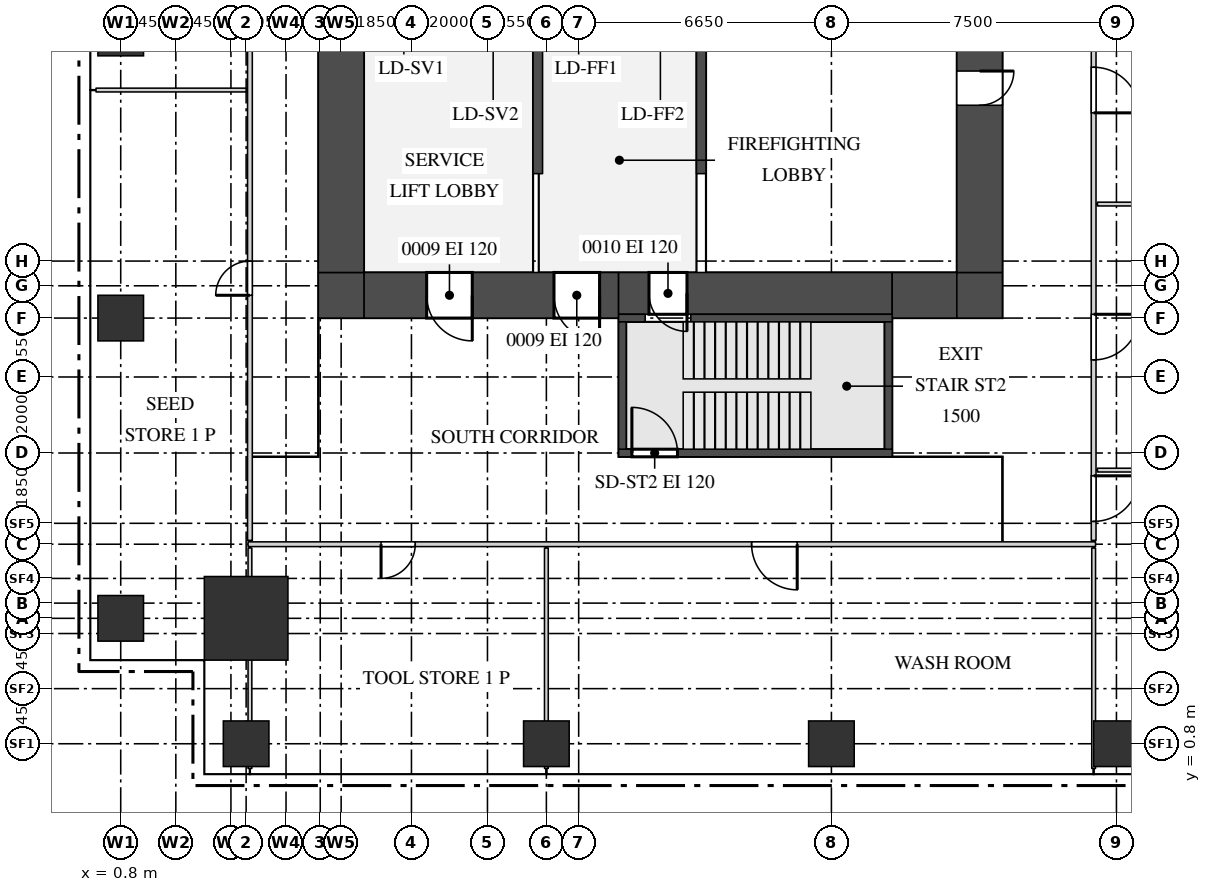
"""IFC4 building model, lengths in metres.
Left out: names, types, materials, properties, quantities, classifications, styles, units other than length and angle.
Written with IfcOpenShell. Run it as: python <this file> out.ifc"""

import sys

from ifc_helpers import new_model, si_unit, direction, frame, frame_2d, origin, origin_2d, place, context, subcontext, project, spatial, rectangle, extrude, source, transform, mapped, element, fill, save


model = new_model("IFC4")
c1 = context("Model", 3, precision=1e-05, world=origin(), true_north=direction((0.0, 1.0)))
c2 = subcontext(c1, "Body", "Model", "MODEL_VIEW")
j1 = project(units=[si_unit("LENGTHUNIT", "METRE"), si_unit("PLANEANGLEUNIT", "RADIAN")], contexts=[c1])
p1 = place(None, origin())
s1 = spatial("IfcSite", under=j1, at=p1, CompositionType="ELEMENT")
p2 = place(p1, origin())
s2 = spatial("IfcBuilding", under=s1, at=p2, CompositionType="ELEMENT")
p3 = place(p2, frame((0.0, 0.0, 60.0)))
s3 = spatial("IfcBuildingStorey", under=s2, at=p3, CompositionType="ELEMENT", Elevation=60.0)
m1 = source(origin(), c2, "Body", "SweptSolid", [
    extrude(rectangle(XDim=6.7, YDim=1.2, at=frame_2d((3.35, 0.0))), origin(), (0.0, 0.0, 1.0), 4.2),
])
p4 = place(p3, frame((7.2, 12.6, 0.0), z_axis=(0.0, 0.0, 1.0), x_axis=(1.0, 0.0, 0.0)))
e1 = element("IfcWall", 1, at=p4, inside=s3, PredefinedType="SHEAR", context=c2, shape_type="MappedRepresentation", body=[
    mapped(m1, transform((0.0, 0.0, 0.0))),
])
m2 = source(origin(), c2, "Body", "SweptSolid", [
    extrude(rectangle(XDim=1.2, YDim=2.1, at=frame_2d((0.6, 1.05))), frame((0.0, 0.61, 0.0), z_axis=(0.0, -1.0, 0.0), x_axis=(1.0, 0.0, 0.0)), (0.0, 0.0, 1.0), 1.22),
])
p5 = place(p4, frame((5.0, 0.0, 0.0)))
e2 = element("IfcOpeningElement", 2, at=p5, cuts=e1, PredefinedType="OPENING", context=c2, shape_type="MappedRepresentation", body=[
    mapped(m2, transform((0.0, 0.0, 0.0))),
])
p6 = place(p4, frame((1.65, 0.0, 0.0)))
e3 = element("IfcOpeningElement", 3, at=p6, cuts=e1, PredefinedType="OPENING", context=c2, shape_type="MappedRepresentation", body=[
    mapped(m2, transform((0.0, 0.0, 0.0))),
])
m3 = source(origin(), c2, "Body", "SweptSolid", [
    extrude(rectangle(XDim=7.2, YDim=1.1, at=frame_2d((3.6, 0.0))), origin(), (0.0, 0.0, 1.0), 4.2),
])
p7 = place(p3, frame((13.9, 12.65, 0.0), z_axis=(0.0, 0.0, 1.0), x_axis=(1.0, 0.0, 0.0)))
e4 = element("IfcWall", 4, at=p7, inside=s3, PredefinedType="SHEAR", context=c2, shape_type="MappedRepresentation", body=[
    mapped(m3, transform((0.0, 0.0, 0.0))),
])
m4 = source(origin(), c2, "Body", "SweptSolid", [
    extrude(rectangle(XDim=1.0, YDim=2.1, at=frame_2d((0.5, 1.05))), frame((0.0, 0.56, 0.0), z_axis=(0.0, -1.0, 0.0), x_axis=(1.0, 0.0, 0.0)), (0.0, 0.0, 1.0), 1.12),
])
p8 = place(p7, frame((0.8, 0.0, 0.0)))
e5 = element("IfcOpeningElement", 5, at=p8, cuts=e4, PredefinedType="OPENING", context=c2, shape_type="MappedRepresentation", body=[
    mapped(m4, transform((0.0, 0.0, 0.0))),
])
m5 = source(origin(), c2, "Body", "SweptSolid", [
    extrude(rectangle(XDim=1.7, YDim=1.2, at=frame_2d((0.85, 0.0))), origin(), (0.0, 0.0, 1.0), 4.2),
])
p9 = place(p3, frame((21.1, 12.6, 0.0), z_axis=(0.0, 0.0, 1.0), x_axis=(1.0, 0.0, 0.0)))
e6 = element("IfcWall", 6, at=p9, inside=s3, PredefinedType="SHEAR", context=c2, shape_type="MappedRepresentation", body=[
    mapped(m5, transform((0.0, 0.0, 0.0))),
])
m6 = source(origin(), c2, "Body", "SweptSolid", [
    extrude(rectangle(XDim=1.2, YDim=1.2, at=frame_2d((0.6, 0.0))), origin(), (0.0, 0.0, 1.0), 4.2),
])
for number, where, z_axis, x_axis in (
    (7, (22.8, 12.6, 0.0), (0.0, 0.0, 1.0), (1.0, 0.0, 0.0)),
    (8, (6.0, 12.6, 0.0), (0.0, 0.0, 1.0), (1.0, 0.0, 0.0)),
):
    element("IfcWall", number, at=place(p3, frame(where, z_axis=z_axis, x_axis=x_axis)), inside=s3, PredefinedType="SHEAR", context=c2, shape_type="MappedRepresentation", body=[
        mapped(m6, transform((0.0, 0.0, 0.0))),
    ])
m7 = source(origin(), c2, "Body", "SweptSolid", [
    extrude(rectangle(XDim=27.6, YDim=1.2, at=frame_2d((13.8, 0.0))), origin(), (0.0, 0.0, 1.0), 4.2),
])
p10 = place(p3, frame((23.4, 13.2, 0.0), z_axis=(0.0, 0.0, 1.0), x_axis=(0.0, 1.0, 0.0)))
e9 = element("IfcWall", 9, at=p10, inside=s3, PredefinedType="SHEAR", context=c2, shape_type="MappedRepresentation", body=[
    mapped(m7, transform((0.0, 0.0, 0.0))),
])
m8 = source(origin(), c2, "Body", "SweptSolid", [
    extrude(rectangle(XDim=1.8, YDim=2.1, at=frame_2d((0.9, 1.05))), frame((0.0, 0.61, 0.0), z_axis=(0.0, -1.0, 0.0), x_axis=(1.0, 0.0, 0.0)), (0.0, 0.0, 1.0), 1.22),
])
p11 = place(p10, frame((22.4, 0.0, 0.0)))
e10 = element("IfcOpeningElement", 10, at=p11, cuts=e9, PredefinedType="OPENING", context=c2, shape_type="MappedRepresentation", body=[
    mapped(m8, transform((0.0, 0.0, 0.0))),
])
p12 = place(p10, frame((12.15, 0.0, 0.0)))
e11 = element("IfcOpeningElement", 11, at=p12, cuts=e9, PredefinedType="OPENING", context=c2, shape_type="MappedRepresentation", body=[
    mapped(m2, transform((0.0, 0.0, 0.0))),
])
m9 = source(origin(), c2, "Body", "SweptSolid", [
    extrude(rectangle(XDim=0.9, YDim=2.1, at=frame_2d((0.45, 1.05))), frame((0.0, 0.61, 0.0), z_axis=(0.0, -1.0, 0.0), x_axis=(1.0, 0.0, 0.0)), (0.0, 0.0, 1.0), 1.22),
])
p13 = place(p10, frame((4.4, 0.0, 0.0)))
e12 = element("IfcOpeningElement", 12, at=p13, cuts=e9, PredefinedType="OPENING", context=c2, shape_type="MappedRepresentation", body=[
    mapped(m9, transform((0.0, 0.0, 0.0))),
])
p14 = place(p3, frame((6.6, 13.2, 0.0), z_axis=(0.0, 0.0, 1.0), x_axis=(0.0, 1.0, 0.0)))
e13 = element("IfcWall", 13, at=p14, inside=s3, PredefinedType="SHEAR", context=c2, shape_type="MappedRepresentation", body=[
    mapped(m7, transform((0.0, 0.0, 0.0))),
])
m10 = source(origin(), c2, "Body", "SweptSolid", [
    extrude(rectangle(XDim=0.7, YDim=0.2, at=frame_2d((0.35, 0.0))), origin(), (0.0, 0.0, 1.0), 4.2),
])
p15 = place(p3, frame((13.9, 12.0, 0.0), z_axis=(0.0, 0.0, 1.0), x_axis=(1.0, 0.0, 0.0)))
e14 = element("IfcWall", 14, at=p15, inside=s3, PredefinedType="SHEAR", context=c2, shape_type="MappedRepresentation", body=[
    mapped(m10, transform((0.0, 0.0, 0.0))),
])
m11 = source(origin(), c2, "Body", "SweptSolid", [
    extrude(rectangle(XDim=5.3, YDim=0.2, at=frame_2d((2.65, 0.0))), origin(), (0.0, 0.0, 1.0), 4.2),
])
p16 = place(p3, frame((15.8, 12.0, 0.0), z_axis=(0.0, 0.0, 1.0), x_axis=(1.0, 0.0, 0.0)))
e15 = element("IfcWall", 15, at=p16, inside=s3, PredefinedType="SHEAR", context=c2, shape_type="MappedRepresentation", body=[
    mapped(m11, transform((0.0, 0.0, 0.0))),
])
m12 = source(origin(), c2, "Body", "SweptSolid", [
    extrude(rectangle(XDim=7.2, YDim=0.2, at=frame_2d((3.6, 0.0))), origin(), (0.0, 0.0, 1.0), 4.2),
])
p17 = place(p3, frame((13.9, 8.45, 0.0), z_axis=(0.0, 0.0, 1.0), x_axis=(1.0, 0.0, 0.0)))
e16 = element("IfcWall", 16, at=p17, inside=s3, PredefinedType="SHEAR", context=c2, shape_type="MappedRepresentation", body=[
    mapped(m12, transform((0.0, 0.0, 0.0))),
])
m13 = source(origin(), c2, "Body", "SweptSolid", [
    extrude(rectangle(XDim=1.2, YDim=2.1, at=frame_2d((0.6, 1.05))), frame((0.0, 0.11, 0.0), z_axis=(0.0, -1.0, 0.0), x_axis=(1.0, 0.0, 0.0)), (0.0, 0.0, 1.0), 0.22),
])
p18 = place(p17, frame((0.35, 0.0, 0.0)))
e17 = element("IfcOpeningElement", 17, at=p18, cuts=e16, PredefinedType="OPENING", context=c2, shape_type="MappedRepresentation", body=[
    mapped(m13, transform((0.0, 0.0, 0.0))),
])
m14 = source(origin(), c2, "Body", "SweptSolid", [
    extrude(rectangle(XDim=3.35, YDim=0.2, at=frame_2d((1.675, 0.0))), origin(), (0.0, 0.0, 1.0), 4.2),
])
for number, where, z_axis, x_axis in (
    (18, (21.0, 8.55, 0.0), (0.0, 0.0, 1.0), (0.0, 1.0, 0.0)),
    (19, (14.0, 8.55, 0.0), (0.0, 0.0, 1.0), (0.0, 1.0, 0.0)),
):
    element("IfcWall", number, at=place(p3, frame(where, z_axis=z_axis, x_axis=x_axis)), inside=s3, PredefinedType="SHEAR", context=c2, shape_type="MappedRepresentation", body=[
        mapped(m14, transform((0.0, 0.0, 0.0))),
    ])
m15 = source(origin(), c2, "Body", "SweptSolid", [
    extrude(rectangle(XDim=3.4, YDim=0.25, at=frame_2d((1.7, 0.0))), origin(), (0.0, 0.0, 1.0), 4.2),
])
for number, where, z_axis, x_axis in (
    (20, (16.075, 15.8, 0.0), (0.0, 0.0, 1.0), (0.0, 1.0, 0.0)),
    (21, (11.775, 15.8, 0.0), (0.0, 0.0, 1.0), (0.0, 1.0, 0.0)),
):
    element("IfcWall", number, at=place(p3, frame(where, z_axis=z_axis, x_axis=x_axis)), inside=s3, PredefinedType="STANDARD", context=c2, shape_type="MappedRepresentation", body=[
        mapped(m15, transform((0.0, 0.0, 0.0))),
    ])
m16 = source(origin(), c2, "Body", "SweptSolid", [
    extrude(rectangle(XDim=2.2, YDim=2.2, at=origin_2d()), origin(), (0.0, 0.0, 1.0), 4.5),
])
p19 = place(p3, frame((4.1, 4.1, 0.0), z_axis=(0.0, 0.0, 1.0), x_axis=(1.0, 0.0, 0.0)))
e22 = element("IfcColumn", 22, at=p19, inside=s3, PredefinedType="COLUMN", context=c2, shape_type="MappedRepresentation", body=[
    mapped(m16, transform((0.0, 0.0, 0.0))),
])
m17 = source(origin(), c2, "Body", "SweptSolid", [
    extrude(rectangle(XDim=1.2, YDim=1.2, at=origin_2d()), origin(), (0.0, 0.0, 1.0), 4.2),
])
for number, where, z_axis, x_axis in (
    (23, (4.1, 0.8, 0.0), (0.0, 0.0, 1.0), (1.0, 0.0, 0.0)),
    (24, (12.0, 0.8, 0.0), (0.0, 0.0, 1.0), (1.0, 0.0, 0.0)),
    (25, (19.5, 0.8, 0.0), (0.0, 0.0, 1.0), (1.0, 0.0, 0.0)),
    (26, (27.0, 0.8, 0.0), (0.0, 0.0, 1.0), (1.0, 0.0, 0.0)),
    (27, (0.8, 4.1, 0.0), (0.0, 0.0, 1.0), (1.0, 0.0, 0.0)),
    (28, (0.8, 12.0, 0.0), (0.0, 0.0, 1.0), (1.0, 0.0, 0.0)),
    (29, (0.8, 19.5, 0.0), (0.0, 0.0, 1.0), (1.0, 0.0, 0.0)),
):
    element("IfcColumn", number, at=place(p3, frame(where, z_axis=z_axis, x_axis=x_axis)), inside=s3, PredefinedType="COLUMN", context=c2, shape_type="MappedRepresentation", body=[
        mapped(m17, transform((0.0, 0.0, 0.0))),
    ])
m18 = source(origin(), c2, "Body", "SweptSolid", [
    extrude(rectangle(XDim=5.8, YDim=0.1, at=frame_2d((2.9, 0.0))), origin(), (0.0, 0.0, 1.0), 3.6),
])
p20 = place(p3, frame((4.2, 0.15, 0.0), z_axis=(0.0, 0.0, 1.0), x_axis=(0.0, 1.0, 0.0)))
e30 = element("IfcWall", 30, at=p20, inside=s3, PredefinedType="PARTITIONING", context=c2, shape_type="MappedRepresentation", body=[
    mapped(m18, transform((0.0, 0.0, 0.0))),
])
m19 = source(origin(), c2, "Body", "SweptSolid", [
    extrude(rectangle(XDim=5.8, YDim=0.1, at=frame_2d((2.9, 0.0))), origin(), (0.0, 0.0, 1.0), 3.7),
])
p21 = place(p3, frame((12.0, 0.15, 0.0), z_axis=(0.0, 0.0, 1.0), x_axis=(0.0, 1.0, 0.0)))
e31 = element("IfcWall", 31, at=p21, inside=s3, PredefinedType="PARTITIONING", context=c2, shape_type="MappedRepresentation", body=[
    mapped(m19, transform((0.0, 0.0, 0.0))),
])
m20 = source(origin(), c2, "Body", "SweptSolid", [
    extrude(rectangle(XDim=5.8, YDim=0.1, at=frame_2d((2.9, 0.0))), origin(), (0.0, 0.0, 1.0), 4.3),
])
p22 = place(p3, frame((26.4, 0.15, 0.0), z_axis=(0.0, 0.0, 1.0), x_axis=(0.0, 1.0, 0.0)))
e32 = element("IfcWall", 32, at=p22, inside=s3, PredefinedType="PARTITIONING", context=c2, shape_type="MappedRepresentation", body=[
    mapped(m20, transform((0.0, 0.0, 0.0))),
])
m21 = source(origin(), c2, "Body", "SweptSolid", [
    extrude(rectangle(XDim=22.3, YDim=0.125, at=frame_2d((11.15, 0.0))), origin(), (0.0, 0.0, 1.0), 4.3),
])
p23 = place(p3, frame((4.15, 6.05, 0.0), z_axis=(0.0, 0.0, 1.0), x_axis=(1.0, 0.0, 0.0)))
e33 = element("IfcWall", 33, at=p23, inside=s3, PredefinedType="PARTITIONING", context=c2, shape_type="MappedRepresentation", body=[
    mapped(m21, transform((0.0, 0.0, 0.0))),
])
m22 = source(origin(), c2, "Body", "SweptSolid", [
    extrude(rectangle(XDim=0.9, YDim=2.1, at=frame_2d((0.45, 1.05))), frame((0.0, 0.073, 0.0), z_axis=(0.0, -1.0, 0.0), x_axis=(1.0, 0.0, 0.0)), (0.0, 0.0, 1.0), 0.145),
])
p24 = place(p23, frame((3.5, 0.0, 0.0)))
e34 = element("IfcOpeningElement", 34, at=p24, cuts=e33, PredefinedType="OPENING", context=c2, shape_type="MappedRepresentation", body=[
    mapped(m22, transform((0.0, 0.0, 0.0))),
])
m23 = source(origin(), c2, "Body", "SweptSolid", [
    extrude(rectangle(XDim=1.2, YDim=2.1, at=frame_2d((0.6, 1.05))), frame((0.0, 0.073, 0.0), z_axis=(0.0, -1.0, 0.0), x_axis=(1.0, 0.0, 0.0)), (0.0, 0.0, 1.0), 0.145),
])
p25 = place(p23, frame((13.25, 0.0, 0.0)))
e35 = element("IfcOpeningElement", 35, at=p25, cuts=e33, PredefinedType="OPENING", context=c2, shape_type="MappedRepresentation", body=[
    mapped(m23, transform((0.0, 0.0, 0.0))),
])
m24 = source(origin(), c2, "Body", "SweptSolid", [
    extrude(rectangle(XDim=41.8, YDim=0.125, at=frame_2d((20.9, 0.0))), origin(), (0.0, 0.0, 1.0), 4.3),
])
p26 = place(p3, frame((4.2, 6.15, 0.0), z_axis=(0.0, 0.0, 1.0), x_axis=(0.0, 1.0, 0.0)))
e36 = element("IfcWall", 36, at=p26, inside=s3, PredefinedType="PARTITIONING", context=c2, shape_type="MappedRepresentation", body=[
    mapped(m24, transform((0.0, 0.0, 0.0))),
])
p27 = place(p26, frame((6.45, 0.0, 0.0)))
e37 = element("IfcOpeningElement", 37, at=p27, cuts=e36, PredefinedType="OPENING", context=c2, shape_type="MappedRepresentation", body=[
    mapped(m22, transform((0.0, 0.0, 0.0))),
])
p28 = place(p26, frame((25.05, 0.0, 0.0)))
e38 = element("IfcOpeningElement", 38, at=p28, cuts=e36, PredefinedType="OPENING", context=c2, shape_type="MappedRepresentation", body=[
    mapped(m23, transform((0.0, 0.0, 0.0))),
])
m25 = source(origin(), c2, "Body", "SweptSolid", [
    extrude(rectangle(XDim=29.05, YDim=0.125, at=frame_2d((14.525, 0.0))), origin(), (0.0, 0.0, 1.0), 4.3),
])
p29 = place(p3, frame((26.4, 6.15, 0.0), z_axis=(0.0, 0.0, 1.0), x_axis=(0.0, 1.0, 0.0)))
e39 = element("IfcWall", 39, at=p29, inside=s3, PredefinedType="PARTITIONING", context=c2, shape_type="MappedRepresentation", body=[
    mapped(m25, transform((0.0, 0.0, 0.0))),
])
p30 = place(p29, frame((0.5, 0.0, 0.0)))
e40 = element("IfcOpeningElement", 40, at=p30, cuts=e39, PredefinedType="OPENING", context=c2, shape_type="MappedRepresentation", body=[
    mapped(m23, transform((0.0, 0.0, 0.0))),
])
p31 = place(p29, frame((4.75, 0.0, 0.0)))
e41 = element("IfcOpeningElement", 41, at=p31, cuts=e39, PredefinedType="OPENING", context=c2, shape_type="MappedRepresentation", body=[
    mapped(m23, transform((0.0, 0.0, 0.0))),
])
p32 = place(p29, frame((11.25, 0.0, 0.0)))
e42 = element("IfcOpeningElement", 42, at=p32, cuts=e39, PredefinedType="OPENING", context=c2, shape_type="MappedRepresentation", body=[
    mapped(m23, transform((0.0, 0.0, 0.0))),
])
p33 = place(p29, frame((17.5, 0.0, 0.0)))
e43 = element("IfcOpeningElement", 43, at=p33, cuts=e39, PredefinedType="OPENING", context=c2, shape_type="MappedRepresentation", body=[
    mapped(m23, transform((0.0, 0.0, 0.0))),
])
m26 = source(origin(), c2, "Body", "SweptSolid", [
    extrude(rectangle(XDim=27.35, YDim=0.1, at=frame_2d((13.675, 0.0))), origin(), (0.0, 0.0, 1.0), 4.3),
])
for number, where, z_axis, x_axis in (
    (44, (26.5, 8.0, 0.0), (0.0, 0.0, 1.0), (1.0, 0.0, 0.0)),
    (45, (26.5, 15.0, 0.0), (0.0, 0.0, 1.0), (1.0, 0.0, 0.0)),
):
    element("IfcWall", number, at=place(p3, frame(where, z_axis=z_axis, x_axis=x_axis)), inside=s3, PredefinedType="PARTITIONING", context=c2, shape_type="MappedRepresentation", body=[
        mapped(m26, transform((0.0, 0.0, 0.0))),
    ])
m27 = source(origin(), c2, "Body", "SweptSolid", [
    extrude(rectangle(XDim=3.95, YDim=0.1, at=frame_2d((1.975, 0.0))), origin(), (0.0, 0.0, 1.0), 4.3),
])
p34 = place(p3, frame((0.15, 18.0, 0.0), z_axis=(0.0, 0.0, 1.0), x_axis=(1.0, 0.0, 0.0)))
e46 = element("IfcWall", 46, at=p34, inside=s3, PredefinedType="PARTITIONING", context=c2, shape_type="MappedRepresentation", body=[
    mapped(m27, transform((0.0, 0.0, 0.0))),
])
m28 = source(origin(), c2, "Body", "SweptSolid", [
    extrude(rectangle(XDim=0.9, YDim=2.1, at=frame_2d((0.45, 1.05))), frame((0.0, 0.55, 0.0), z_axis=(0.0, -1.0, 0.0), x_axis=(1.0, 0.0, 0.0)), (0.0, 0.0, 1.0), 1.1),
])
p35 = place(p13, origin())
e47 = element("IfcDoor", 47, at=p35, inside=s3, OperationType="SINGLE_SWING_RIGHT", PredefinedType="DOOR", context=c2, shape_type="MappedRepresentation", body=[
    mapped(m28, transform((0.0, 0.0, 0.0))),
])
fill(e12, e47)
m29 = source(origin(), c2, "Body", "SweptSolid", [
    extrude(rectangle(XDim=1.2, YDim=2.1, at=frame_2d((0.6, 1.05))), frame((0.0, 0.55, 0.0), z_axis=(0.0, -1.0, 0.0), x_axis=(1.0, 0.0, 0.0)), (0.0, 0.0, 1.0), 1.1),
])
p36 = place(p5, origin())
e48 = element("IfcDoor", 48, at=p36, inside=s3, OperationType="SINGLE_SWING_RIGHT", PredefinedType="DOOR", context=c2, shape_type="MappedRepresentation", body=[
    mapped(m29, transform((0.0, 0.0, 0.0))),
])
fill(e2, e48)
p37 = place(p6, origin())
e49 = element("IfcDoor", 49, at=p37, inside=s3, OperationType="SINGLE_SWING_RIGHT", PredefinedType="DOOR", context=c2, shape_type="MappedRepresentation", body=[
    mapped(m29, transform((0.0, 0.0, 0.0))),
])
fill(e3, e49)
m30 = source(origin(), c2, "Body", "SweptSolid", [
    extrude(rectangle(XDim=1.0, YDim=2.1, at=frame_2d((0.5, 1.05))), frame((0.0, 0.5, 0.0), z_axis=(0.0, -1.0, 0.0), x_axis=(1.0, 0.0, 0.0)), (0.0, 0.0, 1.0), 1.0),
])
p38 = place(p8, origin())
e50 = element("IfcDoor", 50, at=p38, inside=s3, OperationType="SINGLE_SWING_RIGHT", PredefinedType="DOOR", context=c2, shape_type="MappedRepresentation", body=[
    mapped(m30, transform((0.0, 0.0, 0.0))),
])
fill(e5, e50)
m31 = source(origin(), c2, "Body", "SweptSolid", [
    extrude(rectangle(XDim=1.2, YDim=2.1, at=frame_2d((0.6, 1.05))), frame((0.0, 0.025, 0.0), z_axis=(0.0, -1.0, 0.0), x_axis=(1.0, 0.0, 0.0)), (0.0, 0.0, 1.0), 0.05),
])
p39 = place(p30, origin())
e51 = element("IfcDoor", 51, at=p39, inside=s3, OperationType="SINGLE_SWING_RIGHT", PredefinedType="DOOR", context=c2, shape_type="MappedRepresentation", body=[
    mapped(m31, transform((0.0, 0.0, 0.0))),
])
fill(e40, e51)
p40 = place(p31, origin())
e52 = element("IfcDoor", 52, at=p40, inside=s3, OperationType="SINGLE_SWING_RIGHT", PredefinedType="DOOR", context=c2, shape_type="MappedRepresentation", body=[
    mapped(m31, transform((0.0, 0.0, 0.0))),
])
fill(e41, e52)
p41 = place(p32, origin())
e53 = element("IfcDoor", 53, at=p41, inside=s3, OperationType="SINGLE_SWING_LEFT", PredefinedType="DOOR", context=c2, shape_type="MappedRepresentation", body=[
    mapped(m31, transform((0.0, 0.0, 0.0))),
])
fill(e42, e53)
m32 = source(origin(), c2, "Body", "SweptSolid", [
    extrude(rectangle(XDim=0.9, YDim=2.1, at=frame_2d((0.45, 1.05))), frame((0.0, 0.025, 0.0), z_axis=(0.0, -1.0, 0.0), x_axis=(1.0, 0.0, 0.0)), (0.0, 0.0, 1.0), 0.05),
])
p42 = place(p27, origin())
e54 = element("IfcDoor", 54, at=p42, inside=s3, OperationType="SINGLE_SWING_RIGHT", PredefinedType="DOOR", context=c2, shape_type="MappedRepresentation", body=[
    mapped(m32, transform((0.0, 0.0, 0.0))),
])
fill(e37, e54)
p43 = place(p24, origin())
e55 = element("IfcDoor", 55, at=p43, inside=s3, OperationType="SINGLE_SWING_LEFT", PredefinedType="DOOR", context=c2, shape_type="MappedRepresentation", body=[
    mapped(m32, transform((0.0, 0.0, 0.0))),
])
fill(e34, e55)
p44 = place(p25, origin())
e56 = element("IfcDoor", 56, at=p44, inside=s3, OperationType="SINGLE_SWING_RIGHT", PredefinedType="DOOR", context=c2, shape_type="MappedRepresentation", body=[
    mapped(m31, transform((0.0, 0.0, 0.0))),
])
fill(e35, e56)
p45 = place(p18, origin())
e57 = element("IfcDoor", 57, at=p45, inside=s3, OperationType="SINGLE_SWING_RIGHT", PredefinedType="DOOR", context=c2, shape_type="MappedRepresentation", body=[
    mapped(m31, transform((0.0, 0.0, 0.0))),
])
fill(e17, e57)
save(model, sys.argv[1])
